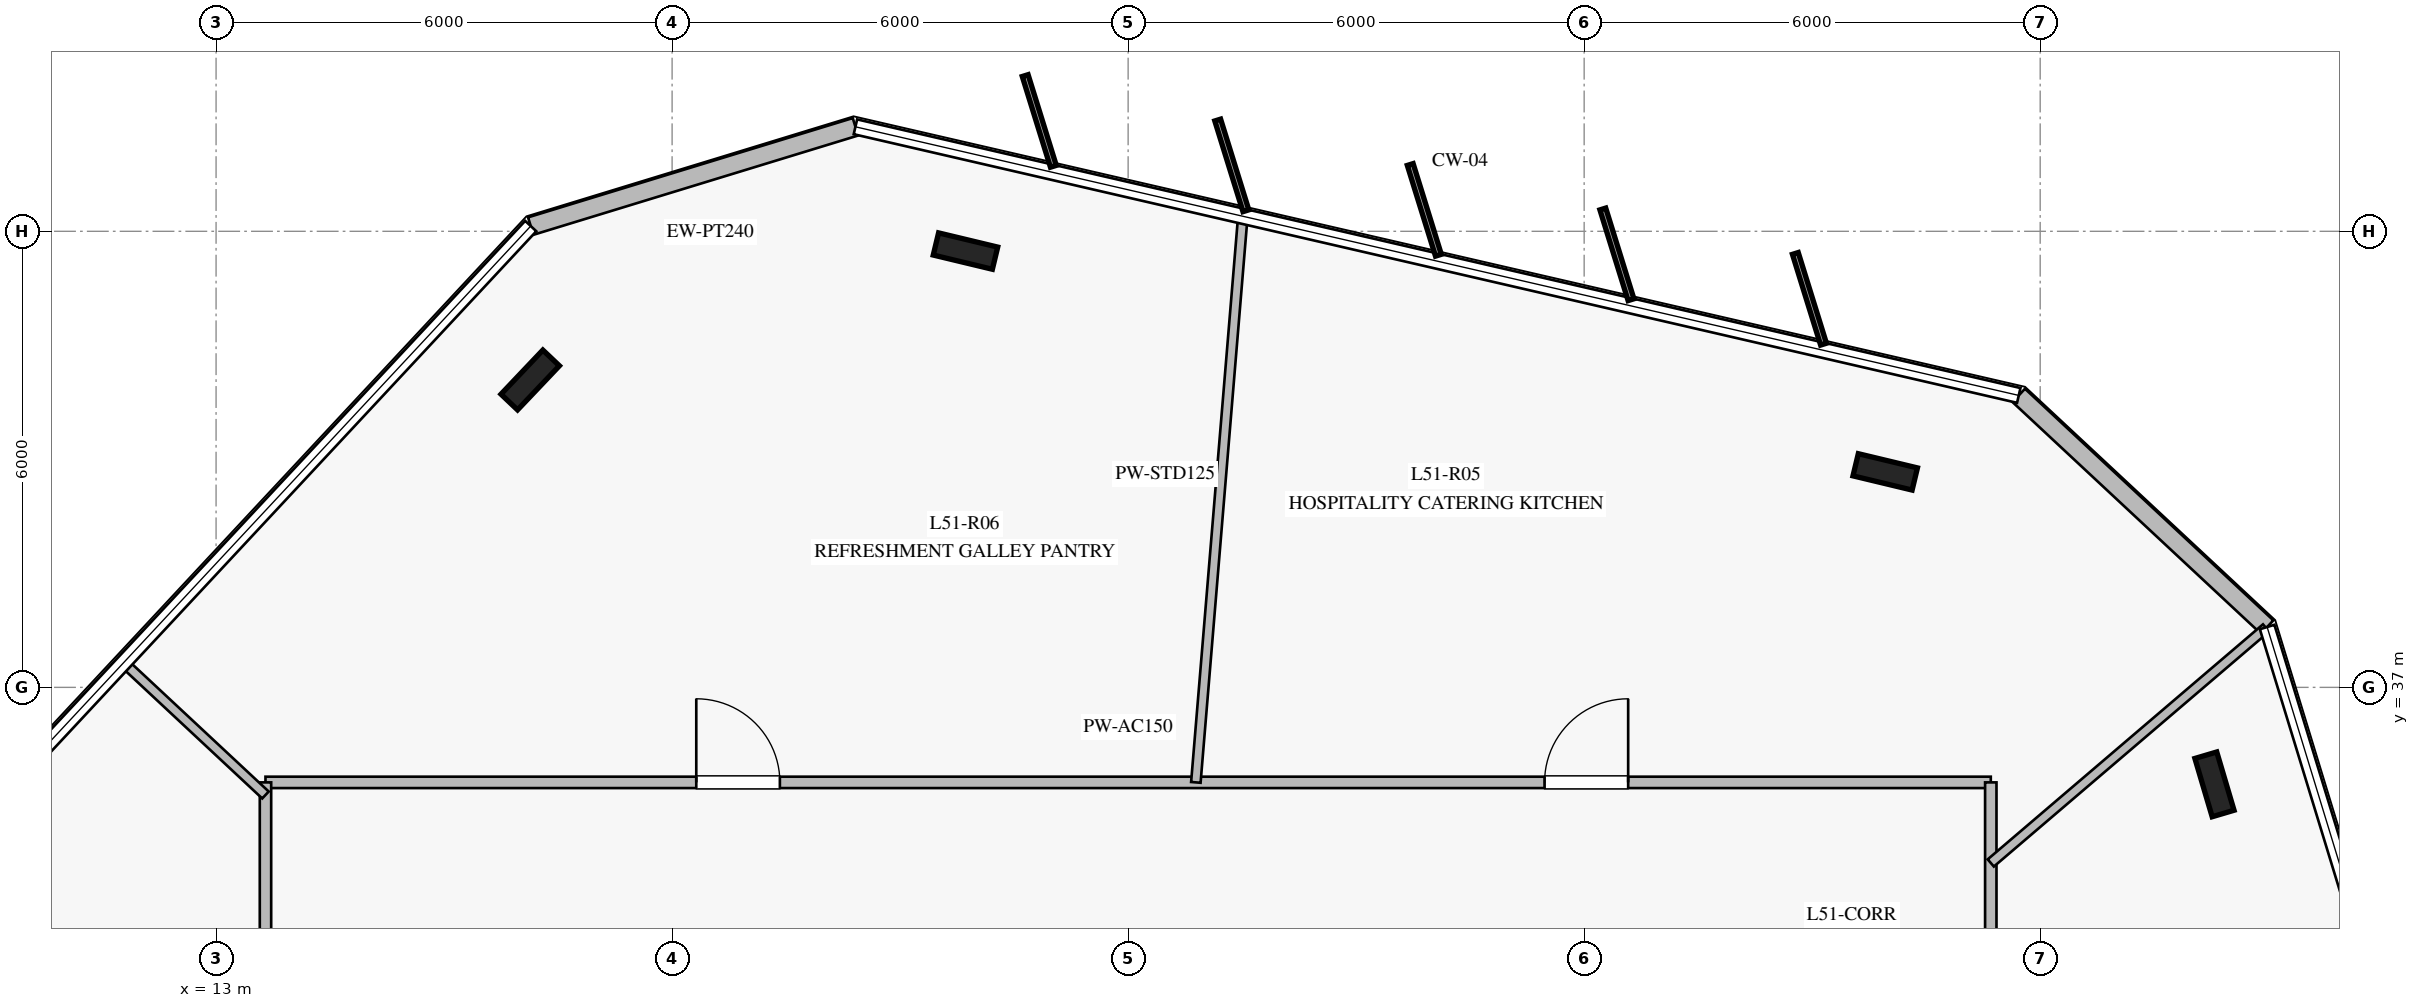
"""IFC4 building model, lengths in metres.
Left out: names, types, materials, properties, quantities, classifications, styles, units other than length and angle.
Written with IfcOpenShell. Run it as: python <this file> out.ifc"""

import sys

from ifc_helpers import new_model, si_unit, direction, frame, frame_2d, origin, origin_2d, place, context, subcontext, project, spatial, rectangle, i_section, extrude, element, fill, save


model = new_model("IFC4")
c1 = context("Model", 3, precision=1e-05, world=origin(), true_north=direction((0.0, 1.0)))
c2 = subcontext(c1, "Body", "Model", "MODEL_VIEW")
j1 = project(units=[si_unit("LENGTHUNIT", "METRE"), si_unit("PLANEANGLEUNIT", "RADIAN")], contexts=[c1])
p1 = place(None, origin())
s1 = spatial("IfcSite", under=j1, at=p1, CompositionType="ELEMENT")
p2 = place(p1, origin())
s2 = spatial("IfcBuilding", under=s1, at=p2, CompositionType="ELEMENT")
p3 = place(p2, frame((0.0, 0.0, 212.8)))
s3 = spatial("IfcBuildingStorey", under=s2, at=p3, CompositionType="ELEMENT", Elevation=212.8)
for number, where, z_axis, x_axis in (
    (1, (34.961, 39.835, 0.0), (0.0, 0.0, 1.0), (-0.972, 0.233, 0.0)),
    (2, (22.86, 42.74, 0.0), (0.0, 0.0, 1.0), (-0.972, 0.233, 0.0)),
    (3, (17.133, 41.044, 0.0), (0.0, 0.0, 1.0), (0.688, 0.725, 0.0)),
    (4, (39.293, 35.724, 0.0), (0.0, 0.0, 1.0), (-0.284, 0.959, 0.0)),
):
    element("IfcColumn", number, at=place(p3, frame(where, z_axis=z_axis, x_axis=x_axis)), inside=s3, PredefinedType="COLUMN", context=c2, shape_type="SweptSolid", body=[
        extrude(i_section(OverallWidth=0.3, OverallDepth=0.8, WebThickness=0.018, FlangeThickness=0.033, at=origin_2d()), origin(), (0.0, 0.0, 1.0), 4.0),
    ])
p4 = place(p3, frame((21.412, 44.375, 0.0), z_axis=(0.0, 0.0, 1.0), x_axis=(-0.956319747301, -0.29232266577, 0.0)))
e5 = element("IfcWall", 5, at=p4, inside=s3, PredefinedType="STANDARD", context=c2, shape_type="SweptSolid", body=[
    extrude(rectangle(XDim=4.467, YDim=0.24, at=frame_2d((2.234, 0.0))), origin(), (0.0, 0.0, 1.0), 3.78),
])
p5 = place(p3, frame((39.986, 37.794, 0.0), z_axis=(0.0, 0.0, 1.0), x_axis=(-0.73139858415, 0.681950226265, 0.0)))
e6 = element("IfcWall", 6, at=p5, inside=s3, PredefinedType="STANDARD", context=c2, shape_type="SweptSolid", body=[
    extrude(rectangle(XDim=4.468, YDim=0.24, at=frame_2d((2.234, 0.0))), origin(), (0.0, 0.0, 1.0), 3.78),
])
p6 = place(p3, frame((13.65, 35.75, 0.0), z_axis=(0.0, 0.0, 1.0), x_axis=(1.0, 0.0, 0.0)))
e7 = element("IfcWall", 7, at=p6, inside=s3, PredefinedType="PARTITIONING", context=c2, shape_type="SweptSolid", body=[
    extrude(rectangle(XDim=22.7, YDim=0.15, at=frame_2d((11.35, 0.0))), origin(), (0.0, 0.0, 1.0), 3.28),
])
p7 = place(p6, frame((16.829, 0.0, 0.0)))
e8 = element("IfcOpeningElement", 8, at=p7, cuts=e7, PredefinedType="OPENING", context=c2, shape_type="SweptSolid", body=[
    extrude(rectangle(XDim=1.1, YDim=2.2, at=frame_2d((0.55, 1.1))), frame((0.0, 0.085, 0.0), z_axis=(0.0, -1.0, 0.0), x_axis=(1.0, 0.0, 0.0)), (0.0, 0.0, 1.0), 0.17),
])
p8 = place(p6, frame((5.668, 0.0, 0.0)))
e9 = element("IfcOpeningElement", 9, at=p8, cuts=e7, PredefinedType="OPENING", context=c2, shape_type="SweptSolid", body=[
    extrude(rectangle(XDim=1.1, YDim=2.2, at=frame_2d((0.55, 1.1))), frame((0.0, 0.085, 0.0), z_axis=(0.0, -1.0, 0.0), x_axis=(1.0, 0.0, 0.0)), (0.0, 0.0, 1.0), 0.17),
])
p9 = place(p3, frame((36.35, 35.75, 0.0), z_axis=(0.0, 0.0, 1.0), x_axis=(0.0, -1.0, 0.0)))
e10 = element("IfcWall", 10, at=p9, inside=s3, PredefinedType="PARTITIONING", context=c2, shape_type="SweptSolid", body=[
    extrude(rectangle(XDim=21.5, YDim=0.15, at=frame_2d((10.75, 0.0))), origin(), (0.0, 0.0, 1.0), 3.02),
])
p10 = place(p9, frame((16.13, 0.0, 0.0)))
e11 = element("IfcOpeningElement", 11, at=p10, cuts=e10, PredefinedType="OPENING", context=c2, shape_type="SweptSolid", body=[
    extrude(rectangle(XDim=1.1, YDim=2.2, at=frame_2d((0.55, 1.1))), frame((0.0, 0.085, 0.0), z_axis=(0.0, -1.0, 0.0), x_axis=(1.0, 0.0, 0.0)), (0.0, 0.0, 1.0), 0.17),
])
p11 = place(p9, frame((5.966, 0.0, 0.0)))
e12 = element("IfcOpeningElement", 12, at=p11, cuts=e10, PredefinedType="OPENING", context=c2, shape_type="SweptSolid", body=[
    extrude(rectangle(XDim=1.1, YDim=2.2, at=frame_2d((0.55, 1.1))), frame((0.0, 0.085, 0.0), z_axis=(0.0, -1.0, 0.0), x_axis=(1.0, 0.0, 0.0)), (0.0, 0.0, 1.0), 0.17),
])
p12 = place(p3, frame((13.65, 14.25, 0.0), z_axis=(0.0, 0.0, 1.0), x_axis=(0.0, 1.0, 0.0)))
e13 = element("IfcWall", 13, at=p12, inside=s3, PredefinedType="PARTITIONING", context=c2, shape_type="SweptSolid", body=[
    extrude(rectangle(XDim=21.5, YDim=0.15, at=frame_2d((10.75, 0.0))), origin(), (0.0, 0.0, 1.0), 3.05),
])
p13 = place(p12, frame((14.514, 0.0, 0.0)))
e14 = element("IfcOpeningElement", 14, at=p13, cuts=e13, PredefinedType="OPENING", context=c2, shape_type="SweptSolid", body=[
    extrude(rectangle(XDim=1.1, YDim=2.2, at=frame_2d((0.55, 1.1))), frame((0.0, 0.085, 0.0), z_axis=(0.0, -1.0, 0.0), x_axis=(1.0, 0.0, 0.0)), (0.0, 0.0, 1.0), 0.17),
])
p14 = place(p3, frame((25.891, 35.75, 0.0), z_axis=(0.0, 0.0, 1.0), x_axis=(0.082728483197, 0.996572123867, 0.0)))
e15 = element("IfcWall", 15, at=p14, inside=s3, PredefinedType="PARTITIONING", context=c2, shape_type="SweptSolid", body=[
    extrude(rectangle(XDim=7.458, YDim=0.125, at=frame_2d((3.729, 0.0))), origin(), (0.0, 0.0, 1.0), 3.18),
])
p15 = place(p3, frame((13.65, 35.584, 0.0), z_axis=(0.0, 0.0, 1.0), x_axis=(-0.731138505923, 0.682229056225, 0.0)))
e16 = element("IfcWall", 16, at=p15, inside=s3, PredefinedType="PARTITIONING", context=c2, shape_type="SweptSolid", body=[
    extrude(rectangle(XDim=2.536, YDim=0.125, at=frame_2d((1.268, 0.0))), origin(), (0.0, 0.0, 1.0), 3.18),
])
p16 = place(p3, frame((36.35, 34.69, 0.0), z_axis=(0.0, 0.0, 1.0), x_axis=(0.760539803365, 0.649291311737, 0.0)))
e17 = element("IfcWall", 17, at=p16, inside=s3, PredefinedType="PARTITIONING", context=c2, shape_type="SweptSolid", body=[
    extrude(rectangle(XDim=4.762, YDim=0.125, at=frame_2d((2.381, 0.0))), origin(), (0.0, 0.0, 1.0), 3.18),
])
p17 = place(p7, origin())
e18 = element("IfcDoor", 18, at=p17, inside=s3, OperationType="SINGLE_SWING_RIGHT", PredefinedType="DOOR", context=c2, shape_type="SweptSolid", body=[
    extrude(rectangle(XDim=1.1, YDim=2.2, at=frame_2d((0.55, 1.1))), frame((0.0, 0.025, 0.0), z_axis=(0.0, -1.0, 0.0), x_axis=(1.0, 0.0, 0.0)), (0.0, 0.0, 1.0), 0.05),
])
fill(e8, e18)
p18 = place(p8, origin())
e19 = element("IfcDoor", 19, at=p18, inside=s3, OperationType="SINGLE_SWING_LEFT", PredefinedType="DOOR", context=c2, shape_type="SweptSolid", body=[
    extrude(rectangle(XDim=1.1, YDim=2.2, at=frame_2d((0.55, 1.1))), frame((0.0, 0.025, 0.0), z_axis=(0.0, -1.0, 0.0), x_axis=(1.0, 0.0, 0.0)), (0.0, 0.0, 1.0), 0.05),
])
fill(e9, e19)
save(model, sys.argv[1])
